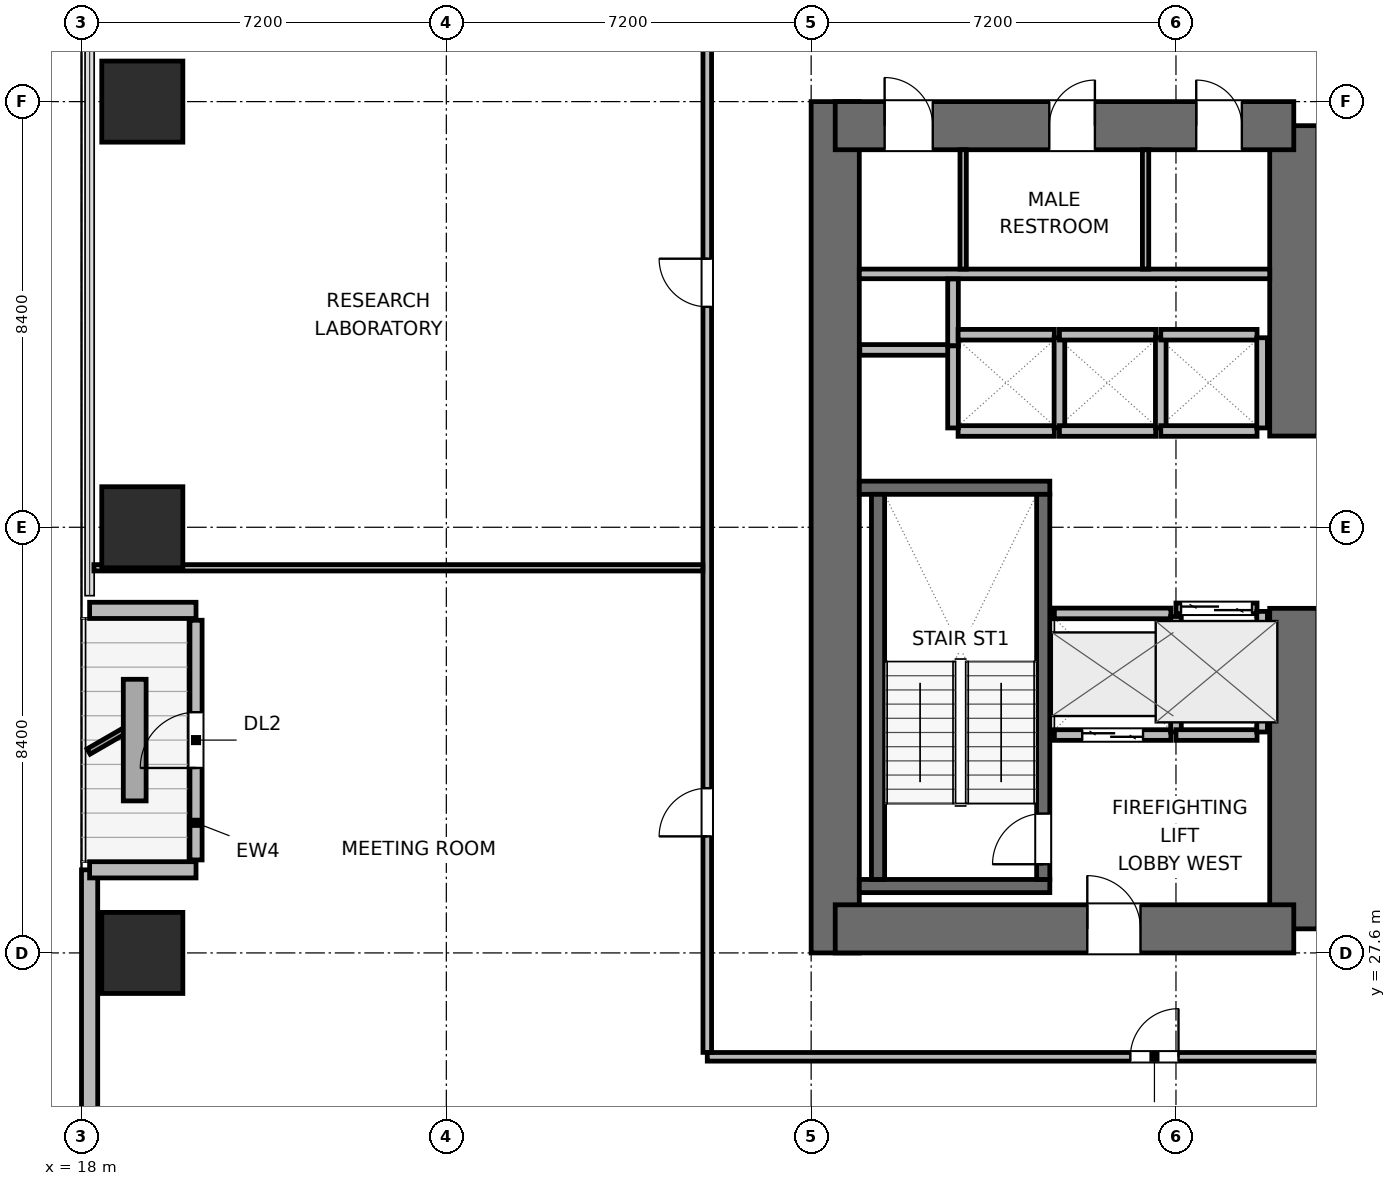
"""IFC4 building model, lengths in metres.
Left out: names, types, materials, properties, quantities, classifications, styles, units other than length and angle.
Written with IfcOpenShell. Run it as: python <this file> out.ifc"""

import sys

from ifc_helpers import new_model, si_unit, direction, frame, frame_2d, origin, origin_2d, place, context, subcontext, project, spatial, rectangle, extrude, element, fill, save


model = new_model("IFC4")
c1 = context("Model", 3, precision=1e-05, world=origin(), true_north=direction((0.0, 1.0)))
c2 = subcontext(c1, "Body", "Model", "MODEL_VIEW")
j1 = project(units=[si_unit("LENGTHUNIT", "METRE"), si_unit("PLANEANGLEUNIT", "RADIAN")], contexts=[c1])
p1 = place(None, origin())
s1 = spatial("IfcSite", under=j1, at=p1, CompositionType="ELEMENT")
p2 = place(p1, origin())
s2 = spatial("IfcBuilding", under=s1, at=p2, CompositionType="ELEMENT")
p3 = place(p2, frame((0.0, 0.0, 29.4)))
s3 = spatial("IfcBuildingStorey", under=s2, at=p3, CompositionType="ELEMENT", Elevation=29.4)
p4 = place(p3, frame((32.875, 27.6, 0.0), z_axis=(0.0, 0.0, 1.0), x_axis=(0.0, 1.0, 0.0)))
e1 = element("IfcWall", 1, at=p4, inside=s3, PredefinedType="SHEAR", context=c2, shape_type="SweptSolid", body=[
    extrude(rectangle(XDim=16.8, YDim=0.95, at=frame_2d((8.4, 0.0))), origin(), (0.0, 0.0, 1.0), 3.9),
])
p5 = place(p3, frame((41.925, 28.075, 0.0), z_axis=(0.0, 0.0, 1.0), x_axis=(0.0, 1.0, 0.0)))
e2 = element("IfcWall", 2, at=p5, inside=s3, PredefinedType="SHEAR", context=c2, shape_type="SweptSolid", body=[
    extrude(rectangle(XDim=6.325, YDim=0.95, at=frame_2d((3.163, 0.0))), origin(), (0.0, 0.0, 1.0), 3.9),
])
p6 = place(p3, frame((41.925, 37.8, 0.0), z_axis=(0.0, 0.0, 1.0), x_axis=(0.0, 1.0, 0.0)))
e3 = element("IfcWall", 3, at=p6, inside=s3, PredefinedType="SHEAR", context=c2, shape_type="SweptSolid", body=[
    extrude(rectangle(XDim=6.125, YDim=0.95, at=frame_2d((3.062, 0.0))), origin(), (0.0, 0.0, 1.0), 3.9),
])
p7 = place(p3, frame((32.875, 28.075, 0.0), z_axis=(0.0, 0.0, 1.0), x_axis=(1.0, 0.0, 0.0)))
e4 = element("IfcWall", 4, at=p7, inside=s3, PredefinedType="SHEAR", context=c2, shape_type="SweptSolid", body=[
    extrude(rectangle(XDim=9.05, YDim=0.95, at=frame_2d((4.525, 0.0))), origin(), (0.0, 0.0, 1.0), 3.9),
])
p8 = place(p7, frame((4.975, 0.0, 0.0)))
e5 = element("IfcOpeningElement", 5, at=p8, cuts=e4, PredefinedType="OPENING", context=c2, shape_type="SweptSolid", body=[
    extrude(rectangle(XDim=1.05, YDim=2.04, at=frame_2d((0.525, 1.02))), frame((0.0, 0.485, 0.0), z_axis=(0.0, -1.0, 0.0), x_axis=(1.0, 0.0, 0.0)), (0.0, 0.0, 1.0), 0.97),
])
p9 = place(p3, frame((32.875, 43.925, 0.0), z_axis=(0.0, 0.0, 1.0), x_axis=(1.0, 0.0, 0.0)))
e6 = element("IfcWall", 6, at=p9, inside=s3, PredefinedType="SHEAR", context=c2, shape_type="SweptSolid", body=[
    extrude(rectangle(XDim=9.05, YDim=0.95, at=frame_2d((4.525, 0.0))), origin(), (0.0, 0.0, 1.0), 3.9),
])
p10 = place(p9, frame((0.975, 0.0, 0.0)))
e7 = element("IfcOpeningElement", 7, at=p10, cuts=e6, PredefinedType="OPENING", context=c2, shape_type="SweptSolid", body=[
    extrude(rectangle(XDim=0.95, YDim=2.04, at=frame_2d((0.475, 1.02))), frame((0.0, 0.485, 0.0), z_axis=(0.0, -1.0, 0.0), x_axis=(1.0, 0.0, 0.0)), (0.0, 0.0, 1.0), 0.97),
])
p11 = place(p9, frame((4.225, 0.0, 0.0)))
e8 = element("IfcOpeningElement", 8, at=p11, cuts=e6, PredefinedType="OPENING", context=c2, shape_type="SweptSolid", body=[
    extrude(rectangle(XDim=0.9, YDim=2.02, at=frame_2d((0.45, 1.01))), frame((0.0, 0.485, 0.0), z_axis=(0.0, -1.0, 0.0), x_axis=(1.0, 0.0, 0.0)), (0.0, 0.0, 1.0), 0.97),
])
p12 = place(p9, frame((7.125, 0.0, 0.0)))
e9 = element("IfcOpeningElement", 9, at=p12, cuts=e6, PredefinedType="OPENING", context=c2, shape_type="SweptSolid", body=[
    extrude(rectangle(XDim=0.9, YDim=2.02, at=frame_2d((0.45, 1.01))), frame((0.0, 0.485, 0.0), z_axis=(0.0, -1.0, 0.0), x_axis=(1.0, 0.0, 0.0)), (0.0, 0.0, 1.0), 0.97),
])
for number, where, z_axis, x_axis in (
    (10, (33.35, 28.92, 0.0), (0.0, 0.0, 1.0), (1.0, 0.0, 0.0)),
    (11, (33.35, 36.78, 0.0), (0.0, 0.0, 1.0), (1.0, 0.0, 0.0)),
):
    element("IfcWall", number, at=place(p3, frame(where, z_axis=z_axis, x_axis=x_axis)), inside=s3, PredefinedType="SHEAR", context=c2, shape_type="SweptSolid", body=[
        extrude(rectangle(XDim=3.76, YDim=0.26, at=frame_2d((1.88, 0.0))), origin(), (0.0, 0.0, 1.0), 3.9),
    ])
p13 = place(p3, frame((33.72, 29.05, 0.0), z_axis=(0.0, 0.0, 1.0), x_axis=(0.0, 1.0, 0.0)))
e12 = element("IfcWall", 12, at=p13, inside=s3, PredefinedType="SHEAR", context=c2, shape_type="SweptSolid", body=[
    extrude(rectangle(XDim=7.6, YDim=0.26, at=frame_2d((3.8, 0.0))), origin(), (0.0, 0.0, 1.0), 3.9),
])
p14 = place(p3, frame((36.98, 29.05, 0.0), z_axis=(0.0, 0.0, 1.0), x_axis=(0.0, 1.0, 0.0)))
e13 = element("IfcWall", 13, at=p14, inside=s3, PredefinedType="SHEAR", context=c2, shape_type="SweptSolid", body=[
    extrude(rectangle(XDim=7.6, YDim=0.26, at=frame_2d((3.8, 0.0))), origin(), (0.0, 0.0, 1.0), 3.9),
])
p15 = place(p14, frame((0.3, 0.0, 0.0)))
e14 = element("IfcOpeningElement", 14, at=p15, cuts=e13, PredefinedType="OPENING", context=c2, shape_type="SweptSolid", body=[
    extrude(rectangle(XDim=1.0, YDim=2.04, at=frame_2d((0.5, 1.02))), frame((0.0, 0.14, 0.0), z_axis=(0.0, -1.0, 0.0), x_axis=(1.0, 0.0, 0.0)), (0.0, 0.0, 1.0), 0.28),
])
for number, where, z_axis, x_axis in (
    (15, (19.2, 27.6, 0.0), (0.0, 0.0, 1.0), (1.0, 0.0, 0.0)),
    (16, (19.2, 36.0, 0.0), (0.0, 0.0, 1.0), (1.0, 0.0, 0.0)),
    (17, (19.2, 44.4, 0.0), (0.0, 0.0, 1.0), (1.0, 0.0, 0.0)),
):
    element("IfcColumn", number, at=place(p3, frame(where, z_axis=z_axis, x_axis=x_axis)), inside=s3, PredefinedType="COLUMN", context=c2, shape_type="SweptSolid", body=[
        extrude(rectangle(XDim=1.6, YDim=1.6, at=origin_2d()), origin(), (0.0, 0.0, 1.0), 3.9),
    ])
p16 = place(p3, frame((18.16, 15.021, 0.0), z_axis=(0.0, 0.0, 1.0), x_axis=(0.0, 1.0, 0.0)))
e18 = element("IfcWall", 18, at=p16, inside=s3, PredefinedType="SOLIDWALL", context=c2, shape_type="SweptSolid", body=[
    extrude(rectangle(XDim=14.219, YDim=0.32, at=frame_2d((7.109, 0.0))), origin(), (0.0, 0.0, 1.0), 3.64),
])
p17 = place(p3, frame((18.16, 29.24, 0.0), z_axis=(0.0, 0.0, 1.0), x_axis=(1.0, 0.0, 0.0)))
e19 = element("IfcWall", 19, at=p17, inside=s3, PredefinedType="SOLIDWALL", context=c2, shape_type="SweptSolid", body=[
    extrude(rectangle(XDim=2.1, YDim=0.32, at=frame_2d((1.05, 0.0))), origin(), (0.0, 0.0, 1.0), 2.875),
])
p18 = place(p3, frame((20.26, 29.435, 0.0), z_axis=(0.0, 0.0, 1.0), x_axis=(0.0, 1.0, 0.0)))
e20 = element("IfcWall", 20, at=p18, inside=s3, PredefinedType="SOLIDWALL", context=c2, shape_type="SweptSolid", body=[
    extrude(rectangle(XDim=4.73, YDim=0.24, at=frame_2d((2.365, 0.0))), origin(), (0.0, 0.0, 1.0), 3.162),
])
p19 = place(p18, frame((1.815, 0.0, 0.0)))
e21 = element("IfcOpeningElement", 21, at=p19, cuts=e20, PredefinedType="OPENING", context=c2, shape_type="SweptSolid", body=[
    extrude(rectangle(XDim=1.1, YDim=2.04, at=frame_2d((0.55, 1.02))), frame((0.0, 0.13, 0.0), z_axis=(0.0, -1.0, 0.0), x_axis=(1.0, 0.0, 0.0)), (0.0, 0.0, 1.0), 0.26),
])
p20 = place(p3, frame((20.26, 34.36, 0.0), z_axis=(0.0, 0.0, 1.0), x_axis=(-1.0, 0.0, 0.0)))
e22 = element("IfcWall", 22, at=p20, inside=s3, PredefinedType="SOLIDWALL", context=c2, shape_type="SweptSolid", body=[
    extrude(rectangle(XDim=2.1, YDim=0.32, at=frame_2d((1.05, 0.0))), origin(), (0.0, 0.0, 1.0), 2.875),
])
p21 = place(p3, frame((33.35, 41.0, 0.0), z_axis=(0.0, 0.0, 1.0), x_axis=(1.0, 0.0, 0.0)))
e23 = element("IfcWall", 23, at=p21, inside=s3, PredefinedType="PLUMBINGWALL", context=c2, shape_type="SweptSolid", body=[
    extrude(rectangle(XDim=8.1, YDim=0.19, at=frame_2d((4.05, 0.0))), origin(), (0.0, 0.0, 1.0), 3.64),
])
for number, where, z_axis, x_axis in (
    (24, (35.4, 41.095, 0.0), (0.0, 0.0, 1.0), (0.0, 1.0, 0.0)),
    (25, (39.0, 41.095, 0.0), (0.0, 0.0, 1.0), (0.0, 1.0, 0.0)),
):
    element("IfcWall", number, at=place(p3, frame(where, z_axis=z_axis, x_axis=x_axis)), inside=s3, PredefinedType="PARTITIONING", context=c2, shape_type="SweptSolid", body=[
        extrude(rectangle(XDim=2.355, YDim=0.125, at=frame_2d((1.177, 0.0))), origin(), (0.0, 0.0, 1.0), 3.64),
    ])
p22 = place(p3, frame((33.36, 39.5, 0.0), z_axis=(0.0, 0.0, 1.0), x_axis=(1.0, 0.0, 0.0)))
e26 = element("IfcWall", 26, at=p22, inside=s3, PredefinedType="PARTITIONING", context=c2, shape_type="SweptSolid", body=[
    extrude(rectangle(XDim=1.86, YDim=0.21, at=frame_2d((0.93, 0.0))), origin(), (0.0, 0.0, 1.0), 3.64),
])
p23 = place(p3, frame((35.2, 39.58, 0.0), z_axis=(0.0, 0.0, 1.0), x_axis=(0.0, 1.0, 0.0)))
e27 = element("IfcWall", 27, at=p23, inside=s3, PredefinedType="PARTITIONING", context=c2, shape_type="SweptSolid", body=[
    extrude(rectangle(XDim=1.32, YDim=0.21, at=frame_2d((0.66, 0.0))), origin(), (0.0, 0.0, 1.0), 3.64),
])
p24 = place(p3, frame((37.2, 31.9, 0.0), z_axis=(0.0, 0.0, 1.0), x_axis=(1.0, 0.0, 0.0)))
e28 = element("IfcWall", 28, at=p24, inside=s3, PredefinedType="PARTITIONING", context=c2, shape_type="SweptSolid", body=[
    extrude(rectangle(XDim=2.3, YDim=0.21, at=frame_2d((1.15, 0.0))), origin(), (0.0, 0.0, 1.0), 3.64),
])
p25 = place(p24, frame((0.55, 0.0, 0.0)))
e29 = element("IfcOpeningElement", 29, at=p25, cuts=e28, PredefinedType="OPENING", context=c2, shape_type="SweptSolid", body=[
    extrude(rectangle(XDim=1.2, YDim=2.04, at=frame_2d((0.6, 1.02))), frame((0.0, 0.115, 0.0), z_axis=(0.0, -1.0, 0.0), x_axis=(1.0, 0.0, 0.0)), (0.0, 0.0, 1.0), 0.23),
])
p26 = place(p3, frame((37.2, 34.3, 0.0), z_axis=(0.0, 0.0, 1.0), x_axis=(1.0, 0.0, 0.0)))
e30 = element("IfcWall", 30, at=p26, inside=s3, PredefinedType="PARTITIONING", context=c2, shape_type="SweptSolid", body=[
    extrude(rectangle(XDim=2.3, YDim=0.21, at=frame_2d((1.15, 0.0))), origin(), (0.0, 0.0, 1.0), 3.64),
])
p27 = place(p3, frame((39.6, 31.96, 0.0), z_axis=(0.0, 0.0, 1.0), x_axis=(0.0, 1.0, 0.0)))
e31 = element("IfcWall", 31, at=p27, inside=s3, PredefinedType="PARTITIONING", context=c2, shape_type="SweptSolid", body=[
    extrude(rectangle(XDim=2.28, YDim=0.21, at=frame_2d((1.14, 0.0))), origin(), (0.0, 0.0, 1.0), 3.64),
])
p28 = place(p3, frame((39.6, 34.4, 0.0), z_axis=(0.0, 0.0, 1.0), x_axis=(1.0, 0.0, 0.0)))
e32 = element("IfcWall", 32, at=p28, inside=s3, PredefinedType="PARTITIONING", context=c2, shape_type="SweptSolid", body=[
    extrude(rectangle(XDim=1.6, YDim=0.21, at=frame_2d((0.8, 0.0))), origin(), (0.0, 0.0, 1.0), 3.64),
])
p29 = place(p28, frame((0.1, 0.0, 0.0)))
e33 = element("IfcOpeningElement", 33, at=p29, cuts=e32, PredefinedType="OPENING", context=c2, shape_type="SweptSolid", body=[
    extrude(rectangle(XDim=1.4, YDim=2.06, at=frame_2d((0.7, 1.03))), frame((0.0, 0.115, 0.0), z_axis=(0.0, -1.0, 0.0), x_axis=(1.0, 0.0, 0.0)), (0.0, 0.0, 1.0), 0.23),
])
p30 = place(p3, frame((39.6, 31.9, 0.0), z_axis=(0.0, 0.0, 1.0), x_axis=(1.0, 0.0, 0.0)))
e34 = element("IfcWall", 34, at=p30, inside=s3, PredefinedType="PARTITIONING", context=c2, shape_type="SweptSolid", body=[
    extrude(rectangle(XDim=1.6, YDim=0.21, at=frame_2d((0.8, 0.0))), origin(), (0.0, 0.0, 1.0), 3.64),
])
p31 = place(p3, frame((41.3, 31.96, 0.0), z_axis=(0.0, 0.0, 1.0), x_axis=(0.0, 1.0, 0.0)))
e35 = element("IfcWall", 35, at=p31, inside=s3, PredefinedType="PARTITIONING", context=c2, shape_type="SweptSolid", body=[
    extrude(rectangle(XDim=2.38, YDim=0.21, at=frame_2d((1.19, 0.0))), origin(), (0.0, 0.0, 1.0), 3.64),
])
for number, where, z_axis, x_axis in (
    (36, (35.3, 37.9, 0.0), (0.0, 0.0, 1.0), (1.0, 0.0, 0.0)),
    (37, (35.3, 39.8, 0.0), (0.0, 0.0, 1.0), (1.0, 0.0, 0.0)),
):
    element("IfcWall", number, at=place(p3, frame(where, z_axis=z_axis, x_axis=x_axis)), inside=s3, PredefinedType="PARTITIONING", context=c2, shape_type="SweptSolid", body=[
        extrude(rectangle(XDim=1.9, YDim=0.21, at=frame_2d((0.95, 0.0))), origin(), (0.0, 0.0, 1.0), 3.64),
    ])
p32 = place(p3, frame((35.2, 37.96, 0.0), z_axis=(0.0, 0.0, 1.0), x_axis=(0.0, 1.0, 0.0)))
e38 = element("IfcWall", 38, at=p32, inside=s3, PredefinedType="PARTITIONING", context=c2, shape_type="SweptSolid", body=[
    extrude(rectangle(XDim=1.62, YDim=0.21, at=frame_2d((0.81, 0.0))), origin(), (0.0, 0.0, 1.0), 3.64),
])
p33 = place(p3, frame((37.3, 37.96, 0.0), z_axis=(0.0, 0.0, 1.0), x_axis=(0.0, 1.0, 0.0)))
e39 = element("IfcWall", 39, at=p33, inside=s3, PredefinedType="PARTITIONING", context=c2, shape_type="SweptSolid", body=[
    extrude(rectangle(XDim=1.78, YDim=0.21, at=frame_2d((0.89, 0.0))), origin(), (0.0, 0.0, 1.0), 3.64),
])
for number, where, z_axis, x_axis in (
    (40, (37.3, 37.9, 0.0), (0.0, 0.0, 1.0), (1.0, 0.0, 0.0)),
    (41, (37.3, 39.8, 0.0), (0.0, 0.0, 1.0), (1.0, 0.0, 0.0)),
):
    element("IfcWall", number, at=place(p3, frame(where, z_axis=z_axis, x_axis=x_axis)), inside=s3, PredefinedType="PARTITIONING", context=c2, shape_type="SweptSolid", body=[
        extrude(rectangle(XDim=1.9, YDim=0.21, at=frame_2d((0.95, 0.0))), origin(), (0.0, 0.0, 1.0), 3.64),
    ])
p34 = place(p3, frame((39.3, 37.96, 0.0), z_axis=(0.0, 0.0, 1.0), x_axis=(0.0, 1.0, 0.0)))
e42 = element("IfcWall", 42, at=p34, inside=s3, PredefinedType="PARTITIONING", context=c2, shape_type="SweptSolid", body=[
    extrude(rectangle(XDim=1.78, YDim=0.21, at=frame_2d((0.89, 0.0))), origin(), (0.0, 0.0, 1.0), 3.64),
])
for number, where, z_axis, x_axis in (
    (43, (39.3, 37.9, 0.0), (0.0, 0.0, 1.0), (1.0, 0.0, 0.0)),
    (44, (39.3, 39.8, 0.0), (0.0, 0.0, 1.0), (1.0, 0.0, 0.0)),
):
    element("IfcWall", number, at=place(p3, frame(where, z_axis=z_axis, x_axis=x_axis)), inside=s3, PredefinedType="PARTITIONING", context=c2, shape_type="SweptSolid", body=[
        extrude(rectangle(XDim=1.9, YDim=0.21, at=frame_2d((0.95, 0.0))), origin(), (0.0, 0.0, 1.0), 3.64),
    ])
p35 = place(p3, frame((41.3, 37.96, 0.0), z_axis=(0.0, 0.0, 1.0), x_axis=(0.0, 1.0, 0.0)))
e45 = element("IfcWall", 45, at=p35, inside=s3, PredefinedType="PARTITIONING", context=c2, shape_type="SweptSolid", body=[
    extrude(rectangle(XDim=1.78, YDim=0.21, at=frame_2d((0.89, 0.0))), origin(), (0.0, 0.0, 1.0), 3.64),
])
p36 = place(p3, frame((30.35, 25.55, 0.0), z_axis=(0.0, 0.0, 1.0), x_axis=(1.0, 0.0, 0.0)))
e46 = element("IfcWall", 46, at=p36, inside=s3, PredefinedType="PARTITIONING", context=c2, shape_type="SweptSolid", body=[
    extrude(rectangle(XDim=35.3, YDim=0.17, at=frame_2d((17.65, 0.0))), origin(), (0.0, 0.0, 1.0), 3.64),
])
p37 = place(p36, frame((8.35, 0.0, 0.0)))
e47 = element("IfcOpeningElement", 47, at=p37, cuts=e46, PredefinedType="OPENING", context=c2, shape_type="SweptSolid", body=[
    extrude(rectangle(XDim=0.95, YDim=2.04, at=frame_2d((0.475, 1.02))), frame((0.0, 0.095, 0.0), z_axis=(0.0, -1.0, 0.0), x_axis=(1.0, 0.0, 0.0)), (0.0, 0.0, 1.0), 0.19),
])
p38 = place(p36, frame((26.0, 0.0, 0.0)))
e48 = element("IfcOpeningElement", 48, at=p38, cuts=e46, PredefinedType="OPENING", context=c2, shape_type="SweptSolid", body=[
    extrude(rectangle(XDim=0.95, YDim=2.04, at=frame_2d((0.475, 1.02))), frame((0.0, 0.095, 0.0), z_axis=(0.0, -1.0, 0.0), x_axis=(1.0, 0.0, 0.0)), (0.0, 0.0, 1.0), 0.19),
])
p39 = place(p3, frame((30.35, 25.637, 0.0), z_axis=(0.0, 0.0, 1.0), x_axis=(0.0, 1.0, 0.0)))
e49 = element("IfcWall", 49, at=p39, inside=s3, PredefinedType="PARTITIONING", context=c2, shape_type="SweptSolid", body=[
    extrude(rectangle(XDim=20.726, YDim=0.17, at=frame_2d((10.363, 0.0))), origin(), (0.0, 0.0, 1.0), 3.64),
])
p40 = place(p39, frame((4.263, 0.0, 0.0)))
e50 = element("IfcOpeningElement", 50, at=p40, cuts=e49, PredefinedType="OPENING", context=c2, shape_type="SweptSolid", body=[
    extrude(rectangle(XDim=0.95, YDim=2.04, at=frame_2d((0.475, 1.02))), frame((0.0, 0.095, 0.0), z_axis=(0.0, -1.0, 0.0), x_axis=(1.0, 0.0, 0.0)), (0.0, 0.0, 1.0), 0.19),
])
p41 = place(p39, frame((14.713, 0.0, 0.0)))
e51 = element("IfcOpeningElement", 51, at=p41, cuts=e49, PredefinedType="OPENING", context=c2, shape_type="SweptSolid", body=[
    extrude(rectangle(XDim=0.95, YDim=2.04, at=frame_2d((0.475, 1.02))), frame((0.0, 0.095, 0.0), z_axis=(0.0, -1.0, 0.0), x_axis=(1.0, 0.0, 0.0)), (0.0, 0.0, 1.0), 0.19),
])
p42 = place(p3, frame((18.245, 35.2, 0.0), z_axis=(0.0, 0.0, 1.0), x_axis=(1.0, 0.0, 0.0)))
e52 = element("IfcWall", 52, at=p42, inside=s3, PredefinedType="PARTITIONING", context=c2, shape_type="SweptSolid", body=[
    extrude(rectangle(XDim=12.018, YDim=0.125, at=frame_2d((6.009, 0.0))), origin(), (0.0, 0.0, 1.0), 3.64),
])
p43 = place(p19, origin())
e53 = element("IfcDoor", 53, at=p43, inside=s3, OperationType="SINGLE_SWING_LEFT", PredefinedType="DOOR", context=c2, shape_type="SweptSolid", body=[
    extrude(rectangle(XDim=1.1, YDim=2.04, at=frame_2d((0.55, 1.02))), frame((0.0, 0.025, 0.0), z_axis=(0.0, -1.0, 0.0), x_axis=(1.0, 0.0, 0.0)), (0.0, 0.0, 1.0), 0.05),
])
fill(e21, e53)
p44 = place(p15, origin())
e54 = element("IfcDoor", 54, at=p44, inside=s3, OperationType="SINGLE_SWING_LEFT", PredefinedType="DOOR", context=c2, shape_type="SweptSolid", body=[
    extrude(rectangle(XDim=1.0, YDim=2.04, at=frame_2d((0.5, 1.02))), frame((0.0, 0.025, 0.0), z_axis=(0.0, -1.0, 0.0), x_axis=(1.0, 0.0, 0.0)), (0.0, 0.0, 1.0), 0.05),
])
fill(e14, e54)
p45 = place(p25, origin())
e55 = element("IfcDoor", 55, at=p45, inside=s3, OperationType="DOUBLE_DOOR_SLIDING", PredefinedType="DOOR", context=c2, shape_type="SweptSolid", body=[
    extrude(rectangle(XDim=1.2, YDim=2.04, at=frame_2d((0.6, 1.02))), frame((0.0, 0.025, 0.0), z_axis=(0.0, -1.0, 0.0), x_axis=(1.0, 0.0, 0.0)), (0.0, 0.0, 1.0), 0.05),
])
fill(e29, e55)
p46 = place(p29, origin())
e56 = element("IfcDoor", 56, at=p46, inside=s3, OperationType="DOUBLE_DOOR_SLIDING", PredefinedType="DOOR", context=c2, shape_type="SweptSolid", body=[
    extrude(rectangle(XDim=1.4, YDim=2.06, at=frame_2d((0.7, 1.03))), frame((0.0, 0.025, 0.0), z_axis=(0.0, -1.0, 0.0), x_axis=(1.0, 0.0, 0.0)), (0.0, 0.0, 1.0), 0.05),
])
fill(e33, e56)
p47 = place(p8, origin())
e57 = element("IfcDoor", 57, at=p47, inside=s3, OperationType="SINGLE_SWING_LEFT", PredefinedType="DOOR", context=c2, shape_type="SweptSolid", body=[
    extrude(rectangle(XDim=1.05, YDim=2.04, at=frame_2d((0.525, 1.02))), frame((0.0, 0.025, 0.0), z_axis=(0.0, -1.0, 0.0), x_axis=(1.0, 0.0, 0.0)), (0.0, 0.0, 1.0), 0.05),
])
fill(e5, e57)
p48 = place(p10, origin())
e58 = element("IfcDoor", 58, at=p48, inside=s3, OperationType="SINGLE_SWING_LEFT", PredefinedType="DOOR", context=c2, shape_type="SweptSolid", body=[
    extrude(rectangle(XDim=0.95, YDim=2.04, at=frame_2d((0.475, 1.02))), frame((0.0, 0.025, 0.0), z_axis=(0.0, -1.0, 0.0), x_axis=(1.0, 0.0, 0.0)), (0.0, 0.0, 1.0), 0.05),
])
fill(e7, e58)
p49 = place(p11, origin())
e59 = element("IfcDoor", 59, at=p49, inside=s3, OperationType="SINGLE_SWING_RIGHT", PredefinedType="DOOR", context=c2, shape_type="SweptSolid", body=[
    extrude(rectangle(XDim=0.9, YDim=2.02, at=frame_2d((0.45, 1.01))), frame((0.0, 0.025, 0.0), z_axis=(0.0, -1.0, 0.0), x_axis=(1.0, 0.0, 0.0)), (0.0, 0.0, 1.0), 0.05),
])
fill(e8, e59)
p50 = place(p12, origin())
e60 = element("IfcDoor", 60, at=p50, inside=s3, OperationType="SINGLE_SWING_LEFT", PredefinedType="DOOR", context=c2, shape_type="SweptSolid", body=[
    extrude(rectangle(XDim=0.9, YDim=2.02, at=frame_2d((0.45, 1.01))), frame((0.0, 0.025, 0.0), z_axis=(0.0, -1.0, 0.0), x_axis=(1.0, 0.0, 0.0)), (0.0, 0.0, 1.0), 0.05),
])
fill(e9, e60)
p51 = place(p37, origin())
e61 = element("IfcDoor", 61, at=p51, inside=s3, OperationType="SINGLE_SWING_RIGHT", PredefinedType="DOOR", context=c2, shape_type="SweptSolid", body=[
    extrude(rectangle(XDim=0.95, YDim=2.04, at=frame_2d((0.475, 1.02))), frame((0.0, 0.025, 0.0), z_axis=(0.0, -1.0, 0.0), x_axis=(1.0, 0.0, 0.0)), (0.0, 0.0, 1.0), 0.05),
])
fill(e47, e61)
p52 = place(p40, origin())
e62 = element("IfcDoor", 62, at=p52, inside=s3, OperationType="SINGLE_SWING_LEFT", PredefinedType="DOOR", context=c2, shape_type="SweptSolid", body=[
    extrude(rectangle(XDim=0.95, YDim=2.04, at=frame_2d((0.475, 1.02))), frame((0.0, 0.025, 0.0), z_axis=(0.0, -1.0, 0.0), x_axis=(1.0, 0.0, 0.0)), (0.0, 0.0, 1.0), 0.05),
])
fill(e50, e62)
p53 = place(p41, origin())
e63 = element("IfcDoor", 63, at=p53, inside=s3, OperationType="SINGLE_SWING_RIGHT", PredefinedType="DOOR", context=c2, shape_type="SweptSolid", body=[
    extrude(rectangle(XDim=0.95, YDim=2.04, at=frame_2d((0.475, 1.02))), frame((0.0, 0.025, 0.0), z_axis=(0.0, -1.0, 0.0), x_axis=(1.0, 0.0, 0.0)), (0.0, 0.0, 1.0), 0.05),
])
fill(e51, e63)
save(model, sys.argv[1])
